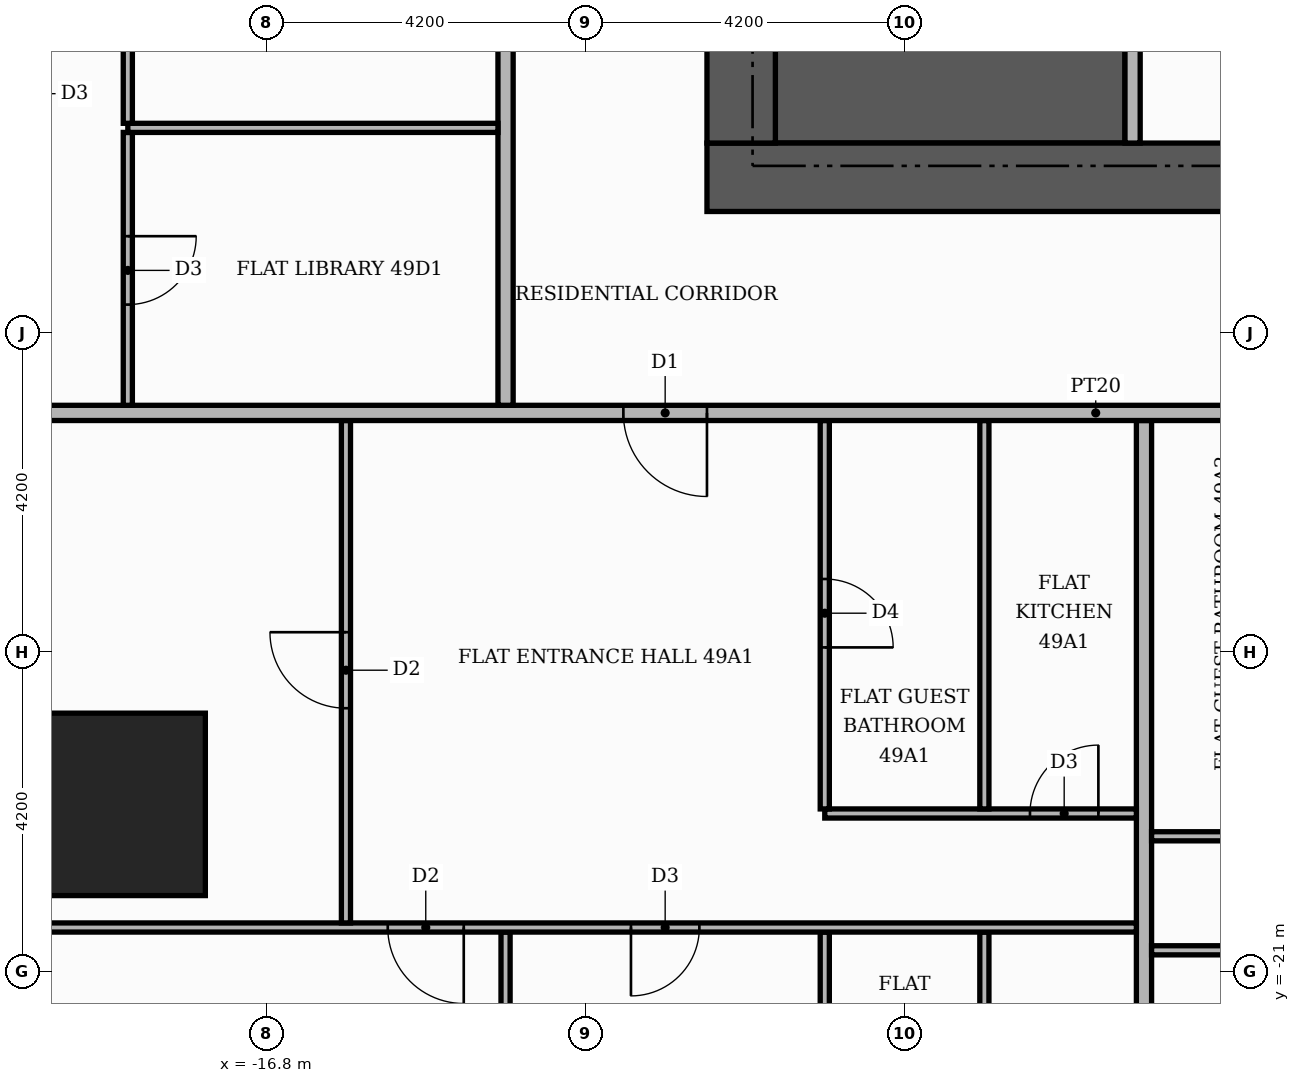
"""IFC4 building model, lengths in metres.
Left out: names, types, materials, properties, quantities, classifications, styles, units other than length and angle.
Written with IfcOpenShell. Run it as: python <this file> out.ifc"""

import sys

from ifc_helpers import new_model, si_unit, direction, frame, frame_2d, origin, origin_2d, place, context, subcontext, project, spatial, rectangle, extrude, element, fill, save


model = new_model("IFC4")
c1 = context("Model", 3, precision=1e-05, world=origin(), true_north=direction((0.0, 1.0)))
c2 = subcontext(c1, "Body", "Model", "MODEL_VIEW")
j1 = project(units=[si_unit("LENGTHUNIT", "METRE"), si_unit("PLANEANGLEUNIT", "RADIAN")], contexts=[c1])
p1 = place(None, origin())
s1 = spatial("IfcSite", under=j1, at=p1, CompositionType="ELEMENT")
p2 = place(p1, origin())
s2 = spatial("IfcBuilding", under=s1, at=p2, CompositionType="ELEMENT")
p3 = place(p2, frame((0.0, 0.0, 207.9)))
s3 = spatial("IfcBuildingStorey", under=s2, at=p3, CompositionType="ELEMENT", Elevation=207.9)
p4 = place(p3, frame((-10.1, -9.15, 0.0), z_axis=(0.0, 0.0, 1.0), x_axis=(1.0, 0.0, 0.0)))
e1 = element("IfcWall", 1, at=p4, inside=s3, PredefinedType="SHEAR", context=c2, shape_type="SweptSolid", body=[
    extrude(rectangle(XDim=4.6, YDim=1.9, at=frame_2d((2.3, 0.0))), origin(), (0.0, 0.0, 1.0), 3.48),
])
p5 = place(p3, frame((-11.0, -10.55, 0.0), z_axis=(0.0, 0.0, 1.0), x_axis=(1.0, 0.0, 0.0)))
e2 = element("IfcWall", 2, at=p5, inside=s3, PredefinedType="SHEAR", context=c2, shape_type="SweptSolid", body=[
    extrude(rectangle(XDim=22.0, YDim=0.9, at=frame_2d((11.0, 0.0))), origin(), (0.0, 0.0, 1.0), 3.48),
])
p6 = place(p5, frame((7.4, 0.0, 0.0)))
e3 = element("IfcOpeningElement", 3, at=p6, cuts=e2, PredefinedType="OPENING", context=c2, shape_type="SweptSolid", body=[
    extrude(rectangle(XDim=1.8, YDim=2.2, at=frame_2d((0.9, 1.1))), frame((0.0, 0.46, 0.0), z_axis=(0.0, -1.0, 0.0), x_axis=(1.0, 0.0, 0.0)), (0.0, 0.0, 1.0), 0.92),
])
p7 = place(p3, frame((-10.55, -10.1, 0.0), z_axis=(0.0, 0.0, 1.0), x_axis=(0.0, 1.0, 0.0)))
e4 = element("IfcWall", 4, at=p7, inside=s3, PredefinedType="SHEAR", context=c2, shape_type="SweptSolid", body=[
    extrude(rectangle(XDim=20.2, YDim=0.9, at=frame_2d((10.1, 0.0))), origin(), (0.0, 0.0, 1.0), 3.48),
])
p8 = place(p3, frame((-18.8, -18.8, 0.0), z_axis=(0.0, 0.0, 1.0), x_axis=(1.0, 0.0, 0.0)))
e5 = element("IfcColumn", 5, at=p8, inside=s3, PredefinedType="COLUMN", context=c2, shape_type="SweptSolid", body=[
    extrude(rectangle(XDim=2.4, YDim=2.4, at=origin_2d()), origin(), (0.0, 0.0, 1.0), 3.9),
])
p9 = place(p3, frame((-5.4, -10.1, 0.0), z_axis=(0.0, 0.0, 1.0), x_axis=(0.0, 1.0, 0.0)))
e6 = element("IfcWall", 6, at=p9, inside=s3, PredefinedType="PARTITIONING", context=c2, shape_type="SweptSolid", body=[
    extrude(rectangle(XDim=4.6, YDim=0.2, at=frame_2d((2.3, 0.0))), origin(), (0.0, 0.0, 1.0), 3.48),
])
p10 = place(p9, frame((2.9, 0.0, 0.0)))
e7 = element("IfcOpeningElement", 7, at=p10, cuts=e6, PredefinedType="OPENING", context=c2, shape_type="SweptSolid", body=[
    extrude(rectangle(XDim=1.0, YDim=2.1, at=frame_2d((0.5, 1.05))), frame((0.0, 0.11, 0.0), z_axis=(0.0, -1.0, 0.0), x_axis=(1.0, 0.0, 0.0)), (0.0, 0.0, 1.0), 0.22),
])
p11 = place(p3, frame((-13.65, -25.42, 0.0), z_axis=(0.0, 0.0, 1.0), x_axis=(0.0, 1.0, 0.0)))
e8 = element("IfcWall", 8, at=p11, inside=s3, PredefinedType="PARTITIONING", context=c2, shape_type="SweptSolid", body=[
    extrude(rectangle(XDim=4.94, YDim=0.12, at=frame_2d((2.47, 0.0))), origin(), (0.0, 0.0, 1.0), 3.48),
])
p12 = place(p3, frame((-9.45, -25.42, 0.0), z_axis=(0.0, 0.0, 1.0), x_axis=(0.0, 1.0, 0.0)))
e9 = element("IfcWall", 9, at=p12, inside=s3, PredefinedType="PARTITIONING", context=c2, shape_type="SweptSolid", body=[
    extrude(rectangle(XDim=4.94, YDim=0.12, at=frame_2d((2.47, 0.0))), origin(), (0.0, 0.0, 1.0), 3.48),
])
p13 = place(p12, frame((1.9, 0.0, 0.0)))
e10 = element("IfcOpeningElement", 10, at=p13, cuts=e9, PredefinedType="OPENING", context=c2, shape_type="SweptSolid", body=[
    extrude(rectangle(XDim=0.9, YDim=2.1, at=frame_2d((0.45, 1.05))), frame((0.0, 0.07, 0.0), z_axis=(0.0, -1.0, 0.0), x_axis=(1.0, 0.0, 0.0)), (0.0, 0.0, 1.0), 0.14),
])
p14 = place(p3, frame((-7.35, -25.42, 0.0), z_axis=(0.0, 0.0, 1.0), x_axis=(0.0, 1.0, 0.0)))
e11 = element("IfcWall", 11, at=p14, inside=s3, PredefinedType="PARTITIONING", context=c2, shape_type="SweptSolid", body=[
    extrude(rectangle(XDim=4.94, YDim=0.12, at=frame_2d((2.47, 0.0))), origin(), (0.0, 0.0, 1.0), 3.48),
])
p15 = place(p14, frame((1.9, 0.0, 0.0)))
e12 = element("IfcOpeningElement", 12, at=p15, cuts=e11, PredefinedType="OPENING", context=c2, shape_type="SweptSolid", body=[
    extrude(rectangle(XDim=0.9, YDim=2.1, at=frame_2d((0.45, 1.05))), frame((0.0, 0.07, 0.0), z_axis=(0.0, -1.0, 0.0), x_axis=(1.0, 0.0, 0.0)), (0.0, 0.0, 1.0), 0.14),
])
p16 = place(p3, frame((-5.25, -25.42, 0.0), z_axis=(0.0, 0.0, 1.0), x_axis=(0.0, 1.0, 0.0)))
e13 = element("IfcWall", 13, at=p16, inside=s3, PredefinedType="PARTITIONING", context=c2, shape_type="SweptSolid", body=[
    extrude(rectangle(XDim=11.67, YDim=0.2, at=frame_2d((5.835, 0.0))), origin(), (0.0, 0.0, 1.0), 3.48),
])
p17 = place(p3, frame((-5.15, -20.72, 0.0), z_axis=(0.0, 0.0, 1.0), x_axis=(1.0, 0.0, 0.0)))
e14 = element("IfcWall", 14, at=p17, inside=s3, PredefinedType="PARTITIONING", context=c2, shape_type="SweptSolid", body=[
    extrude(rectangle(XDim=18.7, YDim=0.12, at=frame_2d((9.35, 0.0))), origin(), (0.0, 0.0, 1.0), 3.48),
])
p18 = place(p17, frame((3.6, 0.0, 0.0)))
e15 = element("IfcOpeningElement", 15, at=p18, cuts=e14, PredefinedType="OPENING", context=c2, shape_type="SweptSolid", body=[
    extrude(rectangle(XDim=1.0, YDim=2.1, at=frame_2d((0.5, 1.05))), frame((0.0, 0.07, 0.0), z_axis=(0.0, -1.0, 0.0), x_axis=(1.0, 0.0, 0.0)), (0.0, 0.0, 1.0), 0.14),
])
p19 = place(p17, frame((11.0, 0.0, 0.0)))
e16 = element("IfcOpeningElement", 16, at=p19, cuts=e14, PredefinedType="OPENING", context=c2, shape_type="SweptSolid", body=[
    extrude(rectangle(XDim=0.9, YDim=2.1, at=frame_2d((0.45, 1.05))), frame((0.0, 0.07, 0.0), z_axis=(0.0, -1.0, 0.0), x_axis=(1.0, 0.0, 0.0)), (0.0, 0.0, 1.0), 0.14),
])
p20 = place(p3, frame((-21.219, -20.42, 0.0), z_axis=(0.0, 0.0, 1.0), x_axis=(1.0, 0.0, 0.0)))
e17 = element("IfcWall", 17, at=p20, inside=s3, PredefinedType="PARTITIONING", context=c2, shape_type="SweptSolid", body=[
    extrude(rectangle(XDim=15.869, YDim=0.12, at=frame_2d((7.935, 0.0))), origin(), (0.0, 0.0, 1.0), 3.48),
])
p21 = place(p20, frame((6.019, 0.0, 0.0)))
e18 = element("IfcOpeningElement", 18, at=p21, cuts=e17, PredefinedType="OPENING", context=c2, shape_type="SweptSolid", body=[
    extrude(rectangle(XDim=1.0, YDim=2.1, at=frame_2d((0.5, 1.05))), frame((0.0, 0.07, 0.0), z_axis=(0.0, -1.0, 0.0), x_axis=(1.0, 0.0, 0.0)), (0.0, 0.0, 1.0), 0.14),
])
p22 = place(p20, frame((9.219, 0.0, 0.0)))
e19 = element("IfcOpeningElement", 19, at=p22, cuts=e17, PredefinedType="OPENING", context=c2, shape_type="SweptSolid", body=[
    extrude(rectangle(XDim=0.9, YDim=2.1, at=frame_2d((0.45, 1.05))), frame((0.0, 0.07, 0.0), z_axis=(0.0, -1.0, 0.0), x_axis=(1.0, 0.0, 0.0)), (0.0, 0.0, 1.0), 0.14),
])
p23 = place(p3, frame((-15.75, -20.36, 0.0), z_axis=(0.0, 0.0, 1.0), x_axis=(0.0, 1.0, 0.0)))
e20 = element("IfcWall", 20, at=p23, inside=s3, PredefinedType="PARTITIONING", context=c2, shape_type="SweptSolid", body=[
    extrude(rectangle(XDim=6.61, YDim=0.12, at=frame_2d((3.305, 0.0))), origin(), (0.0, 0.0, 1.0), 3.48),
])
p24 = place(p23, frame((2.825, 0.0, 0.0)))
e21 = element("IfcOpeningElement", 21, at=p24, cuts=e20, PredefinedType="OPENING", context=c2, shape_type="SweptSolid", body=[
    extrude(rectangle(XDim=1.0, YDim=2.1, at=frame_2d((0.5, 1.05))), frame((0.0, 0.07, 0.0), z_axis=(0.0, -1.0, 0.0), x_axis=(1.0, 0.0, 0.0)), (0.0, 0.0, 1.0), 0.14),
])
p25 = place(p3, frame((-5.15, -19.22, 0.0), z_axis=(0.0, 0.0, 1.0), x_axis=(1.0, 0.0, 0.0)))
e22 = element("IfcWall", 22, at=p25, inside=s3, PredefinedType="PARTITIONING", context=c2, shape_type="SweptSolid", body=[
    extrude(rectangle(XDim=2.0, YDim=0.12, at=frame_2d((1.0, 0.0))), origin(), (0.0, 0.0, 1.0), 3.48),
])
p26 = place(p3, frame((-9.45, -18.92, 0.0), z_axis=(0.0, 0.0, 1.0), x_axis=(1.0, 0.0, 0.0)))
e23 = element("IfcWall", 23, at=p26, inside=s3, PredefinedType="PARTITIONING", context=c2, shape_type="SweptSolid", body=[
    extrude(rectangle(XDim=4.1, YDim=0.12, at=frame_2d((2.05, 0.0))), origin(), (0.0, 0.0, 1.0), 3.48),
])
p27 = place(p26, frame((2.7, 0.0, 0.0)))
e24 = element("IfcOpeningElement", 24, at=p27, cuts=e23, PredefinedType="OPENING", context=c2, shape_type="SweptSolid", body=[
    extrude(rectangle(XDim=0.9, YDim=2.1, at=frame_2d((0.45, 1.05))), frame((0.0, 0.07, 0.0), z_axis=(0.0, -1.0, 0.0), x_axis=(1.0, 0.0, 0.0)), (0.0, 0.0, 1.0), 0.14),
])
p28 = place(p3, frame((-9.45, -18.86, 0.0), z_axis=(0.0, 0.0, 1.0), x_axis=(0.0, 1.0, 0.0)))
e25 = element("IfcWall", 25, at=p28, inside=s3, PredefinedType="PARTITIONING", context=c2, shape_type="SweptSolid", body=[
    extrude(rectangle(XDim=5.11, YDim=0.12, at=frame_2d((2.555, 0.0))), origin(), (0.0, 0.0, 1.0), 3.48),
])
p29 = place(p28, frame((2.125, 0.0, 0.0)))
e26 = element("IfcOpeningElement", 26, at=p29, cuts=e25, PredefinedType="OPENING", context=c2, shape_type="SweptSolid", body=[
    extrude(rectangle(XDim=0.9, YDim=2.1, at=frame_2d((0.45, 1.05))), frame((0.0, 0.07, 0.0), z_axis=(0.0, -1.0, 0.0), x_axis=(1.0, 0.0, 0.0)), (0.0, 0.0, 1.0), 0.14),
])
p30 = place(p3, frame((-7.35, -18.86, 0.0), z_axis=(0.0, 0.0, 1.0), x_axis=(0.0, 1.0, 0.0)))
e27 = element("IfcWall", 27, at=p30, inside=s3, PredefinedType="PARTITIONING", context=c2, shape_type="SweptSolid", body=[
    extrude(rectangle(XDim=5.11, YDim=0.12, at=frame_2d((2.555, 0.0))), origin(), (0.0, 0.0, 1.0), 3.48),
])
p31 = place(p3, frame((-25.42, -13.65, 0.0), z_axis=(0.0, 0.0, 1.0), x_axis=(1.0, 0.0, 0.0)))
e28 = element("IfcWall", 28, at=p31, inside=s3, PredefinedType="PARTITIONING", context=c2, shape_type="SweptSolid", body=[
    extrude(rectangle(XDim=39.07, YDim=0.2, at=frame_2d((19.535, 0.0))), origin(), (0.0, 0.0, 1.0), 3.48),
])
p32 = place(p31, frame((13.32, 0.0, 0.0)))
e29 = element("IfcOpeningElement", 29, at=p32, cuts=e28, PredefinedType="OPENING", context=c2, shape_type="SweptSolid", body=[
    extrude(rectangle(XDim=1.1, YDim=2.4, at=frame_2d((0.55, 1.2))), frame((0.0, 0.11, 0.0), z_axis=(0.0, -1.0, 0.0), x_axis=(1.0, 0.0, 0.0)), (0.0, 0.0, 1.0), 0.22),
])
p33 = place(p31, frame((23.82, 0.0, 0.0)))
e30 = element("IfcOpeningElement", 30, at=p33, cuts=e28, PredefinedType="OPENING", context=c2, shape_type="SweptSolid", body=[
    extrude(rectangle(XDim=1.1, YDim=2.4, at=frame_2d((0.55, 1.2))), frame((0.0, 0.11, 0.0), z_axis=(0.0, -1.0, 0.0), x_axis=(1.0, 0.0, 0.0)), (0.0, 0.0, 1.0), 0.22),
])
p34 = place(p3, frame((-18.62, -13.55, 0.0), z_axis=(0.0, 0.0, 1.0), x_axis=(0.0, 1.0, 0.0)))
e31 = element("IfcWall", 31, at=p34, inside=s3, PredefinedType="PARTITIONING", context=c2, shape_type="SweptSolid", body=[
    extrude(rectangle(XDim=3.59, YDim=0.12, at=frame_2d((1.795, 0.0))), origin(), (0.0, 0.0, 1.0), 3.48),
])
p35 = place(p34, frame((1.325, 0.0, 0.0)))
e32 = element("IfcOpeningElement", 32, at=p35, cuts=e31, PredefinedType="OPENING", context=c2, shape_type="SweptSolid", body=[
    extrude(rectangle(XDim=0.9, YDim=2.1, at=frame_2d((0.45, 1.05))), frame((0.0, 0.07, 0.0), z_axis=(0.0, -1.0, 0.0), x_axis=(1.0, 0.0, 0.0)), (0.0, 0.0, 1.0), 0.14),
])
p36 = place(p3, frame((-13.65, -13.55, 0.0), z_axis=(0.0, 0.0, 1.0), x_axis=(0.0, 1.0, 0.0)))
e33 = element("IfcWall", 33, at=p36, inside=s3, PredefinedType="PARTITIONING", context=c2, shape_type="SweptSolid", body=[
    extrude(rectangle(XDim=27.1, YDim=0.2, at=frame_2d((13.55, 0.0))), origin(), (0.0, 0.0, 1.0), 3.48),
])
p37 = place(p36, frame((24.55, 0.0, 0.0)))
e34 = element("IfcOpeningElement", 34, at=p37, cuts=e33, PredefinedType="OPENING", context=c2, shape_type="SweptSolid", body=[
    extrude(rectangle(XDim=1.1, YDim=2.4, at=frame_2d((0.55, 1.2))), frame((0.0, 0.11, 0.0), z_axis=(0.0, -1.0, 0.0), x_axis=(1.0, 0.0, 0.0)), (0.0, 0.0, 1.0), 0.22),
])
p38 = place(p3, frame((-18.62, -9.9, 0.0), z_axis=(0.0, 0.0, 1.0), x_axis=(1.0, 0.0, 0.0)))
e35 = element("IfcWall", 35, at=p38, inside=s3, PredefinedType="PARTITIONING", context=c2, shape_type="SweptSolid", body=[
    extrude(rectangle(XDim=4.87, YDim=0.12, at=frame_2d((2.435, 0.0))), origin(), (0.0, 0.0, 1.0), 3.48),
])
p39 = place(p3, frame((-18.62, -9.84, 0.0), z_axis=(0.0, 0.0, 1.0), x_axis=(0.0, 1.0, 0.0)))
e36 = element("IfcWall", 36, at=p39, inside=s3, PredefinedType="PARTITIONING", context=c2, shape_type="SweptSolid", body=[
    extrude(rectangle(XDim=3.78, YDim=0.12, at=frame_2d((1.89, 0.0))), origin(), (0.0, 0.0, 1.0), 3.48),
])
p40 = place(p39, frame((1.44, 0.0, 0.0)))
e37 = element("IfcOpeningElement", 37, at=p40, cuts=e36, PredefinedType="OPENING", context=c2, shape_type="SweptSolid", body=[
    extrude(rectangle(XDim=0.9, YDim=2.1, at=frame_2d((0.45, 1.05))), frame((0.0, 0.07, 0.0), z_axis=(0.0, -1.0, 0.0), x_axis=(1.0, 0.0, 0.0)), (0.0, 0.0, 1.0), 0.14),
])
p41 = place(p32, frame((1.1, 0.0, 0.0), z_axis=(0.0, 0.0, 1.0), x_axis=(-1.0, 0.0, 0.0)))
e38 = element("IfcDoor", 38, at=p41, inside=s3, OperationType="SINGLE_SWING_RIGHT", PredefinedType="DOOR", context=c2, shape_type="SweptSolid", body=[
    extrude(rectangle(XDim=1.1, YDim=2.4, at=frame_2d((0.55, 1.2))), frame((0.0, 0.025, 0.0), z_axis=(0.0, -1.0, 0.0), x_axis=(1.0, 0.0, 0.0)), (0.0, 0.0, 1.0), 0.05),
])
fill(e29, e38)
p42 = place(p24, origin())
e39 = element("IfcDoor", 39, at=p42, inside=s3, OperationType="SINGLE_SWING_RIGHT", PredefinedType="DOOR", context=c2, shape_type="SweptSolid", body=[
    extrude(rectangle(XDim=1.0, YDim=2.1, at=frame_2d((0.5, 1.05))), frame((0.0, 0.025, 0.0), z_axis=(0.0, -1.0, 0.0), x_axis=(1.0, 0.0, 0.0)), (0.0, 0.0, 1.0), 0.05),
])
fill(e21, e39)
p43 = place(p29, frame((0.9, 0.0, 0.0), z_axis=(0.0, 0.0, 1.0), x_axis=(-1.0, 0.0, 0.0)))
e40 = element("IfcDoor", 40, at=p43, inside=s3, OperationType="SINGLE_SWING_LEFT", PredefinedType="DOOR", context=c2, shape_type="SweptSolid", body=[
    extrude(rectangle(XDim=0.9, YDim=2.1, at=frame_2d((0.45, 1.05))), frame((0.0, 0.025, 0.0), z_axis=(0.0, -1.0, 0.0), x_axis=(1.0, 0.0, 0.0)), (0.0, 0.0, 1.0), 0.05),
])
fill(e26, e40)
p44 = place(p27, origin())
e41 = element("IfcDoor", 41, at=p44, inside=s3, OperationType="SINGLE_SWING_RIGHT", PredefinedType="DOOR", context=c2, shape_type="SweptSolid", body=[
    extrude(rectangle(XDim=0.9, YDim=2.1, at=frame_2d((0.45, 1.05))), frame((0.0, 0.025, 0.0), z_axis=(0.0, -1.0, 0.0), x_axis=(1.0, 0.0, 0.0)), (0.0, 0.0, 1.0), 0.05),
])
fill(e24, e41)
p45 = place(p21, frame((1.0, 0.0, 0.0), z_axis=(0.0, 0.0, 1.0), x_axis=(-1.0, 0.0, 0.0)))
e42 = element("IfcDoor", 42, at=p45, inside=s3, OperationType="SINGLE_SWING_RIGHT", PredefinedType="DOOR", context=c2, shape_type="SweptSolid", body=[
    extrude(rectangle(XDim=1.0, YDim=2.1, at=frame_2d((0.5, 1.05))), frame((0.0, 0.025, 0.0), z_axis=(0.0, -1.0, 0.0), x_axis=(1.0, 0.0, 0.0)), (0.0, 0.0, 1.0), 0.05),
])
fill(e18, e42)
p46 = place(p22, frame((0.9, 0.0, 0.0), z_axis=(0.0, 0.0, 1.0), x_axis=(-1.0, 0.0, 0.0)))
e43 = element("IfcDoor", 43, at=p46, inside=s3, OperationType="SINGLE_SWING_LEFT", PredefinedType="DOOR", context=c2, shape_type="SweptSolid", body=[
    extrude(rectangle(XDim=0.9, YDim=2.1, at=frame_2d((0.45, 1.05))), frame((0.0, 0.025, 0.0), z_axis=(0.0, -1.0, 0.0), x_axis=(1.0, 0.0, 0.0)), (0.0, 0.0, 1.0), 0.05),
])
fill(e19, e43)
p47 = place(p35, frame((0.9, 0.0, 0.0), z_axis=(0.0, 0.0, 1.0), x_axis=(-1.0, 0.0, 0.0)))
e44 = element("IfcDoor", 44, at=p47, inside=s3, OperationType="SINGLE_SWING_RIGHT", PredefinedType="DOOR", context=c2, shape_type="SweptSolid", body=[
    extrude(rectangle(XDim=0.9, YDim=2.1, at=frame_2d((0.45, 1.05))), frame((0.0, 0.025, 0.0), z_axis=(0.0, -1.0, 0.0), x_axis=(1.0, 0.0, 0.0)), (0.0, 0.0, 1.0), 0.05),
])
fill(e32, e44)
save(model, sys.argv[1])
